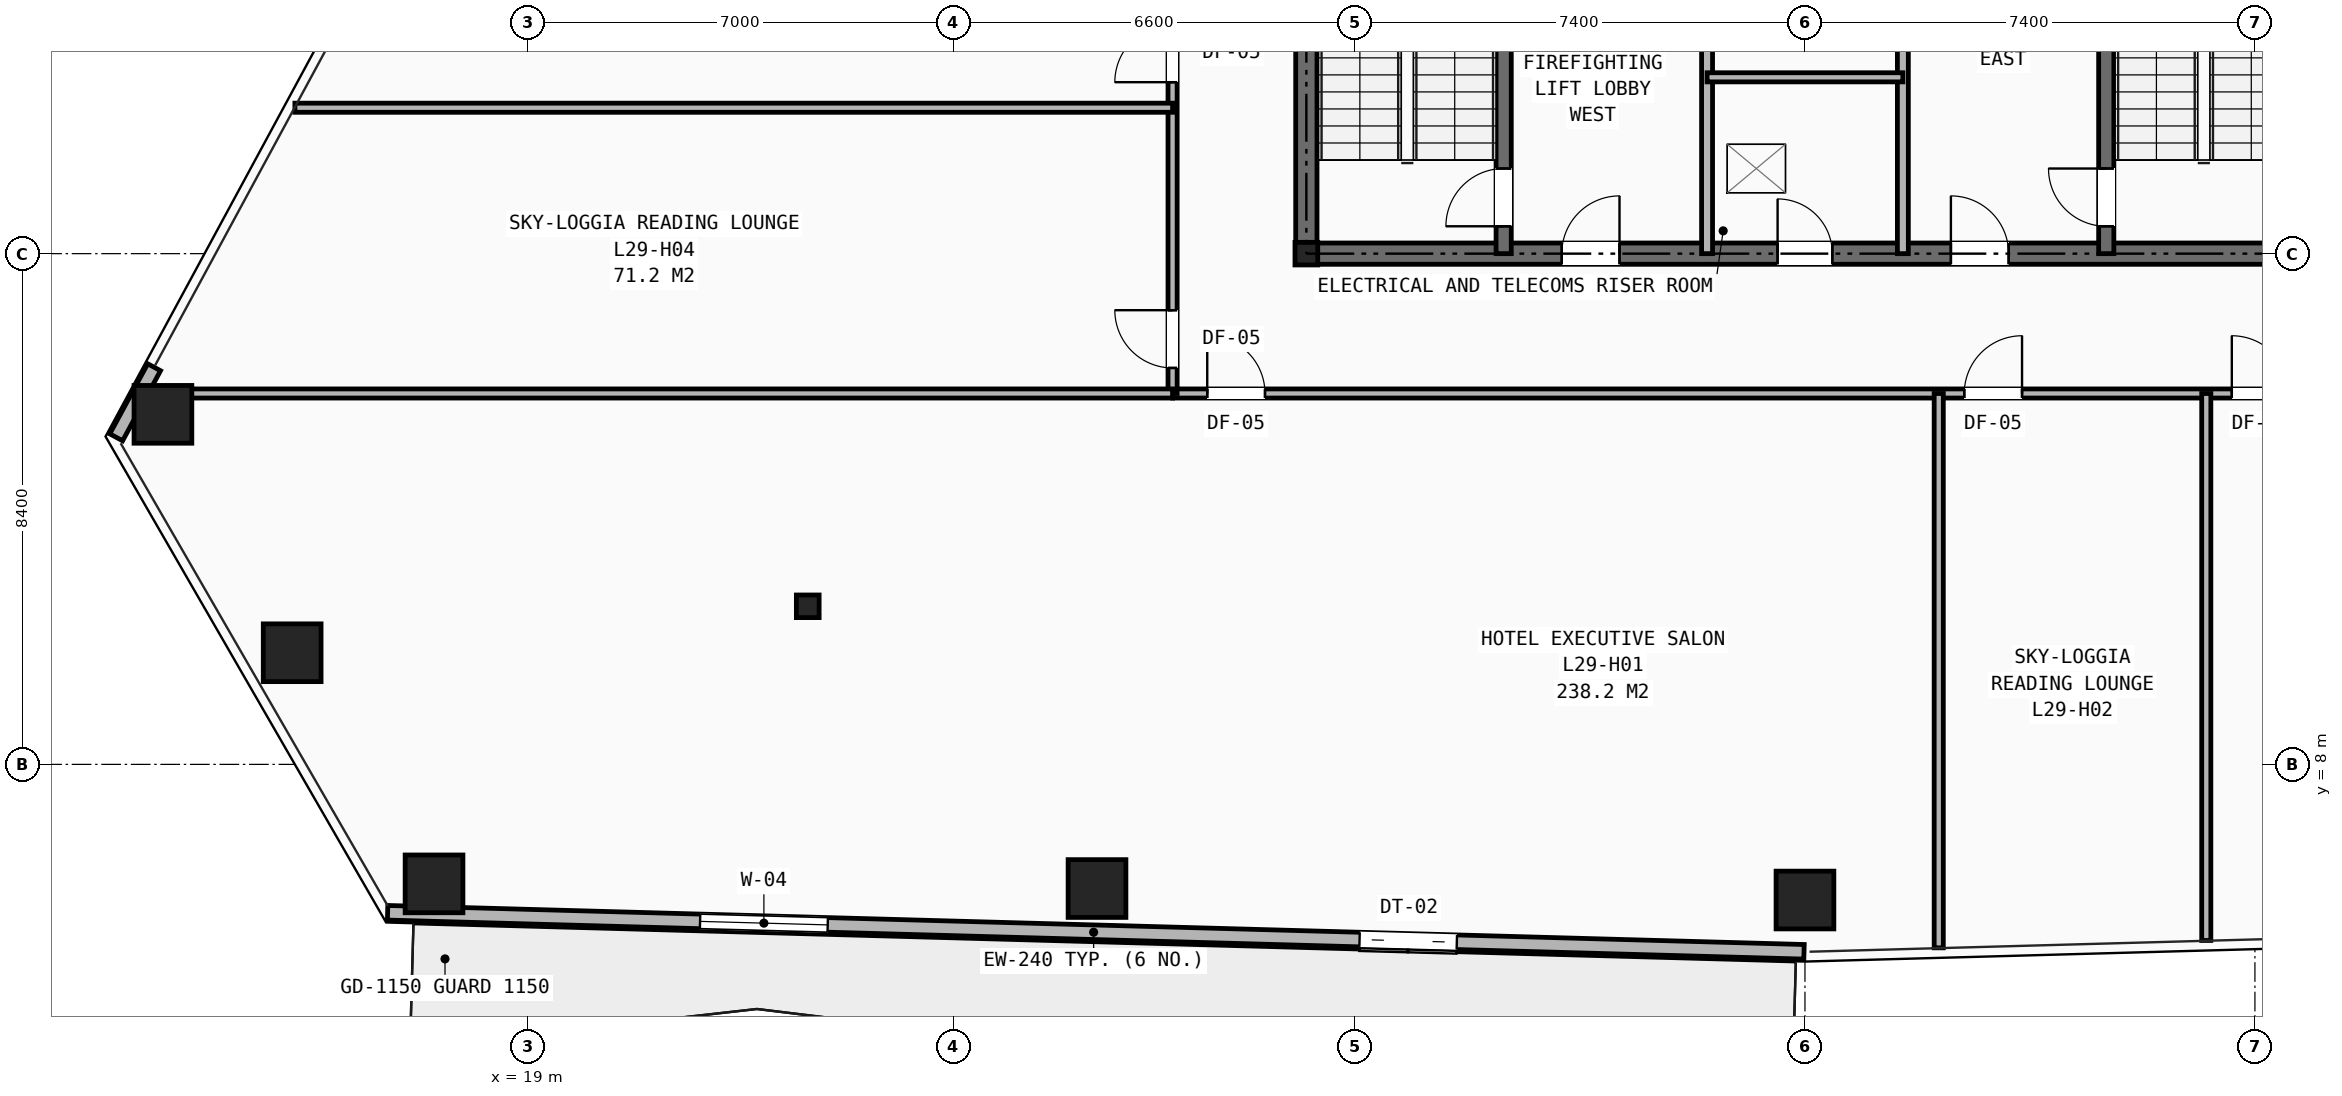
"""IFC4 building model, lengths in metres.
Left out: names, types, materials, properties, quantities, classifications, styles, units other than length and angle.
Written with IfcOpenShell. Run it as: python <this file> out.ifc"""

import sys

from ifc_helpers import new_model, si_unit, direction, frame, frame_2d, origin, origin_2d, place, context, subcontext, project, spatial, rectangle, hollow_rectangle, i_section, extrude, element, fill, save


model = new_model("IFC4")
c1 = context("Model", 3, precision=1e-05, world=origin(), true_north=direction((0.0, 1.0)))
c2 = subcontext(c1, "Body", "Model", "MODEL_VIEW")
j1 = project(units=[si_unit("LENGTHUNIT", "METRE"), si_unit("PLANEANGLEUNIT", "RADIAN")], contexts=[c1])
p1 = place(None, origin())
s1 = spatial("IfcSite", under=j1, at=p1, CompositionType="ELEMENT")
p2 = place(p1, origin())
s2 = spatial("IfcBuilding", under=s1, at=p2, CompositionType="ELEMENT")
p3 = place(p2, frame((0.0, 0.0, 102.2)))
s3 = spatial("IfcBuildingStorey", under=s2, at=p3, CompositionType="ELEMENT", Elevation=102.2)
for number, where, z_axis, x_axis in (
    (1, (31.8, 16.4, 0.0), (0.0, 0.0, 1.0), (1.0, 0.0, 0.0)),
    (2, (23.6, 10.6, 0.0), (0.0, 0.0, 1.0), (1.0, 0.0, 0.0)),
):
    element("IfcColumn", number, at=place(p3, frame(where, z_axis=z_axis, x_axis=x_axis)), inside=s3, PredefinedType="COLUMN", context=c2, shape_type="SweptSolid", body=[
        extrude(i_section(OverallWidth=0.374, OverallDepth=0.372, WebThickness=0.016, FlangeThickness=0.026, at=origin_2d()), origin(), (0.0, 0.0, 1.0), 3.2),
    ])
for number, where, z_axis, x_axis in (
    (3, (12.996, 13.757, 0.0), (0.0, 0.0, 1.0), (1.0, 0.0, 0.0)),
    (4, (15.121, 9.836, 0.0), (0.0, 0.0, 1.0), (1.0, 0.0, 0.0)),
    (5, (17.454, 6.035, 0.0), (0.0, 0.0, 1.0), (1.0, 0.0, 0.0)),
    (6, (28.357, 5.958, 0.0), (0.0, 0.0, 1.0), (1.0, 0.0, 0.0)),
    (7, (40.0, 5.769, 0.0), (0.0, 0.0, 1.0), (1.0, 0.0, 0.0)),
):
    element("IfcColumn", number, at=place(p3, frame(where, z_axis=z_axis, x_axis=x_axis)), inside=s3, PredefinedType="COLUMN", context=c2, shape_type="SweptSolid", body=[
        extrude(hollow_rectangle(XDim=0.95, YDim=0.95, WallThickness=0.065, at=origin_2d()), origin(), (0.0, 0.0, 1.0), 3.2),
    ])
p4 = place(p3, frame((12.85, 14.532, 0.0), z_axis=(0.0, 0.0, 1.0), x_axis=(-0.475820948293, -0.879542167929, 0.0)))
e8 = element("IfcWall", 8, at=p4, inside=s3, PredefinedType="SHEAR", context=c2, shape_type="SweptSolid", body=[
    extrude(rectangle(XDim=1.311, YDim=0.24, at=frame_2d((0.655, 0.0))), origin(), (0.0, 0.0, 1.0), 2.253),
])
p5 = place(p3, frame((39.984, 4.917, 0.0), z_axis=(0.0, 0.0, 1.0), x_axis=(-0.999620599442, 0.027543731983, 0.0)))
e9 = element("IfcWall", 9, at=p5, inside=s3, PredefinedType="SHEAR", context=c2, shape_type="SweptSolid", body=[
    extrude(rectangle(XDim=23.303, YDim=0.24, at=frame_2d((11.651, 0.0))), origin(), (0.0, 0.0, 1.0), 2.253),
])
p6 = place(p5, frame((5.712, 0.0, 0.0)))
e10 = element("IfcOpeningElement", 10, at=p6, cuts=e9, PredefinedType="OPENING", context=c2, shape_type="SweptSolid", body=[
    extrude(rectangle(XDim=1.6, YDim=2.04, at=frame_2d((0.8, 1.02))), frame((0.0, 0.13, 0.0), z_axis=(0.0, -1.0, 0.0), x_axis=(1.0, 0.0, 0.0)), (0.0, 0.0, 1.0), 0.26),
])
p7 = place(p5, frame((16.062, 0.0, 0.25)))
e11 = element("IfcOpeningElement", 11, at=p7, cuts=e9, PredefinedType="OPENING", context=c2, shape_type="SweptSolid", body=[
    extrude(rectangle(XDim=2.1, YDim=1.7, at=frame_2d((1.05, 0.85))), frame((0.0, 0.13, 0.0), z_axis=(0.0, -1.0, 0.0), x_axis=(1.0, 0.0, 0.0)), (0.0, 0.0, 1.0), 0.26),
])
p8 = place(p3, frame((31.8, 16.4, 0.0), z_axis=(0.0, 0.0, 1.0), x_axis=(1.0, 0.0, 0.0)))
e12 = element("IfcWall", 12, at=p8, inside=s3, PredefinedType="SHEAR", context=c2, shape_type="SweptSolid", body=[
    extrude(rectangle(XDim=16.4, YDim=0.35, at=frame_2d((8.2, 0.0))), origin(), (0.0, 0.0, 1.0), 2.97),
])
p9 = place(p8, frame((7.75, 0.0, 0.0)))
e13 = element("IfcOpeningElement", 13, at=p9, cuts=e12, PredefinedType="OPENING", context=c2, shape_type="SweptSolid", body=[
    extrude(rectangle(XDim=0.9, YDim=2.1, at=frame_2d((0.45, 1.05))), frame((0.0, 0.185, 0.0), z_axis=(0.0, -1.0, 0.0), x_axis=(1.0, 0.0, 0.0)), (0.0, 0.0, 1.0), 0.37),
])
p10 = place(p8, frame((4.2, 0.0, 0.0)))
e14 = element("IfcOpeningElement", 14, at=p10, cuts=e12, PredefinedType="OPENING", context=c2, shape_type="SweptSolid", body=[
    extrude(rectangle(XDim=0.95, YDim=2.1, at=frame_2d((0.475, 1.05))), frame((0.0, 0.185, 0.0), z_axis=(0.0, -1.0, 0.0), x_axis=(1.0, 0.0, 0.0)), (0.0, 0.0, 1.0), 0.37),
])
p11 = place(p8, frame((10.6, 0.0, 0.0)))
e15 = element("IfcOpeningElement", 15, at=p11, cuts=e12, PredefinedType="OPENING", context=c2, shape_type="SweptSolid", body=[
    extrude(rectangle(XDim=0.95, YDim=2.1, at=frame_2d((0.475, 1.05))), frame((0.0, 0.185, 0.0), z_axis=(0.0, -1.0, 0.0), x_axis=(1.0, 0.0, 0.0)), (0.0, 0.0, 1.0), 0.37),
])
p12 = place(p3, frame((31.8, 16.4, 0.0), z_axis=(0.0, 0.0, 1.0), x_axis=(0.0, 1.0, 0.0)))
e16 = element("IfcWall", 16, at=p12, inside=s3, PredefinedType="SHEAR", context=c2, shape_type="SweptSolid", body=[
    extrude(rectangle(XDim=14.8, YDim=0.35, at=frame_2d((7.4, 0.0))), origin(), (0.0, 0.0, 1.0), 2.97),
])
p13 = place(p12, frame((11.0, 0.0, 0.0)))
e17 = element("IfcOpeningElement", 17, at=p13, cuts=e16, PredefinedType="OPENING", context=c2, shape_type="SweptSolid", body=[
    extrude(rectangle(XDim=1.1, YDim=2.15, at=frame_2d((0.55, 1.075))), frame((0.0, 0.185, 0.0), z_axis=(0.0, -1.0, 0.0), x_axis=(1.0, 0.0, 0.0)), (0.0, 0.0, 1.0), 0.37),
])
p14 = place(p3, frame((35.045, 16.4, 0.0), z_axis=(0.0, 0.0, 1.0), x_axis=(0.0, 1.0, 0.0)))
e18 = element("IfcWall", 18, at=p14, inside=s3, PredefinedType="SHEAR", context=c2, shape_type="SweptSolid", body=[
    extrude(rectangle(XDim=8.4, YDim=0.25, at=frame_2d((4.2, 0.0))), origin(), (0.0, 0.0, 1.0), 2.97),
])
p15 = place(p14, frame((0.45, 0.0, 0.0)))
e19 = element("IfcOpeningElement", 19, at=p15, cuts=e18, PredefinedType="OPENING", context=c2, shape_type="SweptSolid", body=[
    extrude(rectangle(XDim=0.95, YDim=2.1, at=frame_2d((0.475, 1.05))), frame((0.0, 0.135, 0.0), z_axis=(0.0, -1.0, 0.0), x_axis=(1.0, 0.0, 0.0)), (0.0, 0.0, 1.0), 0.27),
])
p16 = place(p3, frame((44.955, 16.4, 0.0), z_axis=(0.0, 0.0, 1.0), x_axis=(0.0, 1.0, 0.0)))
e20 = element("IfcWall", 20, at=p16, inside=s3, PredefinedType="SHEAR", context=c2, shape_type="SweptSolid", body=[
    extrude(rectangle(XDim=8.4, YDim=0.25, at=frame_2d((4.2, 0.0))), origin(), (0.0, 0.0, 1.0), 2.97),
])
p17 = place(p16, frame((0.45, 0.0, 0.0)))
e21 = element("IfcOpeningElement", 21, at=p17, cuts=e20, PredefinedType="OPENING", context=c2, shape_type="SweptSolid", body=[
    extrude(rectangle(XDim=0.95, YDim=2.1, at=frame_2d((0.475, 1.05))), frame((0.0, 0.135, 0.0), z_axis=(0.0, -1.0, 0.0), x_axis=(1.0, 0.0, 0.0)), (0.0, 0.0, 1.0), 0.27),
])
p18 = place(p3, frame((38.39, 16.4, 0.0), z_axis=(0.0, 0.0, 1.0), x_axis=(0.0, 1.0, 0.0)))
e22 = element("IfcWall", 22, at=p18, inside=s3, PredefinedType="PARTITIONING", context=c2, shape_type="SweptSolid", body=[
    extrude(rectangle(XDim=8.4, YDim=0.18, at=frame_2d((4.2, 0.0))), origin(), (0.0, 0.0, 1.0), 2.421),
])
p19 = place(p18, frame((3.8, 0.0, 0.0)))
e23 = element("IfcOpeningElement", 23, at=p19, cuts=e22, PredefinedType="OPENING", context=c2, shape_type="SweptSolid", body=[
    extrude(rectangle(XDim=0.95, YDim=2.1, at=frame_2d((0.475, 1.05))), frame((0.0, 0.1, 0.0), z_axis=(0.0, -1.0, 0.0), x_axis=(1.0, 0.0, 0.0)), (0.0, 0.0, 1.0), 0.2),
])
p20 = place(p3, frame((41.61, 16.4, 0.0), z_axis=(0.0, 0.0, 1.0), x_axis=(0.0, 1.0, 0.0)))
e24 = element("IfcWall", 24, at=p20, inside=s3, PredefinedType="PARTITIONING", context=c2, shape_type="SweptSolid", body=[
    extrude(rectangle(XDim=8.4, YDim=0.18, at=frame_2d((4.2, 0.0))), origin(), (0.0, 0.0, 1.0), 2.421),
])
p21 = place(p3, frame((38.39, 19.3, 0.0), z_axis=(0.0, 0.0, 1.0), x_axis=(1.0, 0.0, 0.0)))
e25 = element("IfcWall", 25, at=p21, inside=s3, PredefinedType="PARTITIONING", context=c2, shape_type="SweptSolid", body=[
    extrude(rectangle(XDim=3.22, YDim=0.15, at=frame_2d((1.61, 0.0))), origin(), (0.0, 0.0, 1.0), 2.97),
])
p22 = place(p3, frame((29.6, 14.1, 0.0), z_axis=(0.0, 0.0, 1.0), x_axis=(1.0, 0.0, 0.0)))
e26 = element("IfcWall", 26, at=p22, inside=s3, PredefinedType="PARTITIONING", context=c2, shape_type="SweptSolid", body=[
    extrude(rectangle(XDim=20.8, YDim=0.15, at=frame_2d((10.4, 0.0))), origin(), (0.0, 0.0, 1.0), 2.421),
])
p23 = place(p22, frame((0.57, 0.0, 0.0)))
e27 = element("IfcOpeningElement", 27, at=p23, cuts=e26, PredefinedType="OPENING", context=c2, shape_type="SweptSolid", body=[
    extrude(rectangle(XDim=0.95, YDim=2.1, at=frame_2d((0.475, 1.05))), frame((0.0, 0.085, 0.0), z_axis=(0.0, -1.0, 0.0), x_axis=(1.0, 0.0, 0.0)), (0.0, 0.0, 1.0), 0.17),
])
p24 = place(p22, frame((13.02, 0.0, 0.0)))
e28 = element("IfcOpeningElement", 28, at=p24, cuts=e26, PredefinedType="OPENING", context=c2, shape_type="SweptSolid", body=[
    extrude(rectangle(XDim=0.95, YDim=2.1, at=frame_2d((0.475, 1.05))), frame((0.0, 0.085, 0.0), z_axis=(0.0, -1.0, 0.0), x_axis=(1.0, 0.0, 0.0)), (0.0, 0.0, 1.0), 0.17),
])
p25 = place(p22, frame((17.42, 0.0, 0.0)))
e29 = element("IfcOpeningElement", 29, at=p25, cuts=e26, PredefinedType="OPENING", context=c2, shape_type="SweptSolid", body=[
    extrude(rectangle(XDim=0.95, YDim=2.1, at=frame_2d((0.475, 1.05))), frame((0.0, 0.085, 0.0), z_axis=(0.0, -1.0, 0.0), x_axis=(1.0, 0.0, 0.0)), (0.0, 0.0, 1.0), 0.17),
])
p26 = place(p3, frame((29.6, 14.1, 0.0), z_axis=(0.0, 0.0, 1.0), x_axis=(0.0, 1.0, 0.0)))
e30 = element("IfcWall", 30, at=p26, inside=s3, PredefinedType="PARTITIONING", context=c2, shape_type="SweptSolid", body=[
    extrude(rectangle(XDim=21.9, YDim=0.15, at=frame_2d((10.95, 0.0))), origin(), (0.0, 0.0, 1.0), 2.421),
])
p27 = place(p26, frame((0.42, 0.0, 0.0)))
e31 = element("IfcOpeningElement", 31, at=p27, cuts=e30, PredefinedType="OPENING", context=c2, shape_type="SweptSolid", body=[
    extrude(rectangle(XDim=0.95, YDim=2.1, at=frame_2d((0.475, 1.05))), frame((0.0, 0.085, 0.0), z_axis=(0.0, -1.0, 0.0), x_axis=(1.0, 0.0, 0.0)), (0.0, 0.0, 1.0), 0.17),
])
p28 = place(p26, frame((5.12, 0.0, 0.0)))
e32 = element("IfcOpeningElement", 32, at=p28, cuts=e30, PredefinedType="OPENING", context=c2, shape_type="SweptSolid", body=[
    extrude(rectangle(XDim=0.95, YDim=2.1, at=frame_2d((0.475, 1.05))), frame((0.0, 0.085, 0.0), z_axis=(0.0, -1.0, 0.0), x_axis=(1.0, 0.0, 0.0)), (0.0, 0.0, 1.0), 0.17),
])
p29 = place(p26, frame((10.32, 0.0, 0.0)))
e33 = element("IfcOpeningElement", 33, at=p29, cuts=e30, PredefinedType="OPENING", context=c2, shape_type="SweptSolid", body=[
    extrude(rectangle(XDim=0.95, YDim=2.1, at=frame_2d((0.475, 1.05))), frame((0.0, 0.085, 0.0), z_axis=(0.0, -1.0, 0.0), x_axis=(1.0, 0.0, 0.0)), (0.0, 0.0, 1.0), 0.17),
])
p30 = place(p26, frame((16.12, 0.0, 0.0)))
e34 = element("IfcOpeningElement", 34, at=p30, cuts=e30, PredefinedType="OPENING", context=c2, shape_type="SweptSolid", body=[
    extrude(rectangle(XDim=0.95, YDim=2.1, at=frame_2d((0.475, 1.05))), frame((0.0, 0.085, 0.0), z_axis=(0.0, -1.0, 0.0), x_axis=(1.0, 0.0, 0.0)), (0.0, 0.0, 1.0), 0.17),
])
p31 = place(p3, frame((42.2, 4.983, 0.0), z_axis=(0.0, 0.0, 1.0), x_axis=(0.0, 1.0, 0.0)))
e35 = element("IfcWall", 35, at=p31, inside=s3, PredefinedType="PARTITIONING", context=c2, shape_type="SweptSolid", body=[
    extrude(rectangle(XDim=9.117, YDim=0.15, at=frame_2d((4.559, 0.0))), origin(), (0.0, 0.0, 1.0), 2.258),
])
p32 = place(p3, frame((46.6, 5.104, 0.0), z_axis=(0.0, 0.0, 1.0), x_axis=(0.0, 1.0, 0.0)))
e36 = element("IfcWall", 36, at=p32, inside=s3, PredefinedType="PARTITIONING", context=c2, shape_type="SweptSolid", body=[
    extrude(rectangle(XDim=8.996, YDim=0.15, at=frame_2d((4.498, 0.0))), origin(), (0.0, 0.0, 1.0), 2.258),
])
p33 = place(p3, frame((12.622, 14.1, 0.0), z_axis=(0.0, 0.0, 1.0), x_axis=(1.0, 0.0, 0.0)))
e37 = element("IfcWall", 37, at=p33, inside=s3, PredefinedType="PARTITIONING", context=c2, shape_type="SweptSolid", body=[
    extrude(rectangle(XDim=16.978, YDim=0.15, at=frame_2d((8.489, 0.0))), origin(), (0.0, 0.0, 1.0), 2.258),
])
p34 = place(p3, frame((15.166, 18.8, 0.0), z_axis=(0.0, 0.0, 1.0), x_axis=(1.0, 0.0, 0.0)))
e38 = element("IfcWall", 38, at=p34, inside=s3, PredefinedType="PARTITIONING", context=c2, shape_type="SweptSolid", body=[
    extrude(rectangle(XDim=14.434, YDim=0.15, at=frame_2d((7.217, 0.0))), origin(), (0.0, 0.0, 1.0), 2.258),
])
p35 = place(p6, origin())
e39 = element("IfcDoor", 39, at=p35, inside=s3, OperationType="SINGLE_SWING_LEFT", PredefinedType="DOOR", context=c2, shape_type="SweptSolid", body=[
    extrude(rectangle(XDim=1.6, YDim=2.04, at=frame_2d((0.8, 1.02))), frame((0.0, 0.025, 0.0), z_axis=(0.0, -1.0, 0.0), x_axis=(1.0, 0.0, 0.0)), (0.0, 0.0, 1.0), 0.05),
])
fill(e10, e39)
p36 = place(p7, origin())
e40 = element("IfcWindow", 40, at=p36, inside=s3, PartitioningType="SINGLE_PANEL", PredefinedType="WINDOW", context=c2, shape_type="SweptSolid", body=[
    extrude(rectangle(XDim=2.1, YDim=1.7, at=frame_2d((1.05, 0.85))), frame((0.0, 0.03, 0.0), z_axis=(0.0, -1.0, 0.0), x_axis=(1.0, 0.0, 0.0)), (0.0, 0.0, 1.0), 0.06),
])
fill(e11, e40)
p37 = place(p9, origin())
e41 = element("IfcDoor", 41, at=p37, inside=s3, OperationType="SINGLE_SWING_LEFT", PredefinedType="DOOR", context=c2, shape_type="SweptSolid", body=[
    extrude(rectangle(XDim=0.9, YDim=2.1, at=frame_2d((0.45, 1.05))), frame((0.0, 0.025, 0.0), z_axis=(0.0, -1.0, 0.0), x_axis=(1.0, 0.0, 0.0)), (0.0, 0.0, 1.0), 0.05),
])
fill(e13, e41)
p38 = place(p15, origin())
e42 = element("IfcDoor", 42, at=p38, inside=s3, OperationType="SINGLE_SWING_LEFT", PredefinedType="DOOR", context=c2, shape_type="SweptSolid", body=[
    extrude(rectangle(XDim=0.95, YDim=2.1, at=frame_2d((0.475, 1.05))), frame((0.0, 0.025, 0.0), z_axis=(0.0, -1.0, 0.0), x_axis=(1.0, 0.0, 0.0)), (0.0, 0.0, 1.0), 0.05),
])
fill(e19, e42)
p39 = place(p17, origin())
e43 = element("IfcDoor", 43, at=p39, inside=s3, OperationType="SINGLE_SWING_RIGHT", PredefinedType="DOOR", context=c2, shape_type="SweptSolid", body=[
    extrude(rectangle(XDim=0.95, YDim=2.1, at=frame_2d((0.475, 1.05))), frame((0.0, 0.025, 0.0), z_axis=(0.0, -1.0, 0.0), x_axis=(1.0, 0.0, 0.0)), (0.0, 0.0, 1.0), 0.05),
])
fill(e21, e43)
p40 = place(p10, origin())
e44 = element("IfcDoor", 44, at=p40, inside=s3, OperationType="SINGLE_SWING_RIGHT", PredefinedType="DOOR", context=c2, shape_type="SweptSolid", body=[
    extrude(rectangle(XDim=0.95, YDim=2.1, at=frame_2d((0.475, 1.05))), frame((0.0, 0.025, 0.0), z_axis=(0.0, -1.0, 0.0), x_axis=(1.0, 0.0, 0.0)), (0.0, 0.0, 1.0), 0.05),
])
fill(e14, e44)
p41 = place(p11, origin())
e45 = element("IfcDoor", 45, at=p41, inside=s3, OperationType="SINGLE_SWING_LEFT", PredefinedType="DOOR", context=c2, shape_type="SweptSolid", body=[
    extrude(rectangle(XDim=0.95, YDim=2.1, at=frame_2d((0.475, 1.05))), frame((0.0, 0.025, 0.0), z_axis=(0.0, -1.0, 0.0), x_axis=(1.0, 0.0, 0.0)), (0.0, 0.0, 1.0), 0.05),
])
fill(e15, e45)
p42 = place(p23, origin())
e46 = element("IfcDoor", 46, at=p42, inside=s3, OperationType="SINGLE_SWING_LEFT", PredefinedType="DOOR", context=c2, shape_type="SweptSolid", body=[
    extrude(rectangle(XDim=0.95, YDim=2.1, at=frame_2d((0.475, 1.05))), frame((0.0, 0.025, 0.0), z_axis=(0.0, -1.0, 0.0), x_axis=(1.0, 0.0, 0.0)), (0.0, 0.0, 1.0), 0.05),
])
fill(e27, e46)
p43 = place(p24, origin())
e47 = element("IfcDoor", 47, at=p43, inside=s3, OperationType="SINGLE_SWING_RIGHT", PredefinedType="DOOR", context=c2, shape_type="SweptSolid", body=[
    extrude(rectangle(XDim=0.95, YDim=2.1, at=frame_2d((0.475, 1.05))), frame((0.0, 0.025, 0.0), z_axis=(0.0, -1.0, 0.0), x_axis=(1.0, 0.0, 0.0)), (0.0, 0.0, 1.0), 0.05),
])
fill(e28, e47)
p44 = place(p25, origin())
e48 = element("IfcDoor", 48, at=p44, inside=s3, OperationType="SINGLE_SWING_LEFT", PredefinedType="DOOR", context=c2, shape_type="SweptSolid", body=[
    extrude(rectangle(XDim=0.95, YDim=2.1, at=frame_2d((0.475, 1.05))), frame((0.0, 0.025, 0.0), z_axis=(0.0, -1.0, 0.0), x_axis=(1.0, 0.0, 0.0)), (0.0, 0.0, 1.0), 0.05),
])
fill(e29, e48)
p45 = place(p27, origin())
e49 = element("IfcDoor", 49, at=p45, inside=s3, OperationType="SINGLE_SWING_RIGHT", PredefinedType="DOOR", context=c2, shape_type="SweptSolid", body=[
    extrude(rectangle(XDim=0.95, YDim=2.1, at=frame_2d((0.475, 1.05))), frame((0.0, 0.025, 0.0), z_axis=(0.0, -1.0, 0.0), x_axis=(1.0, 0.0, 0.0)), (0.0, 0.0, 1.0), 0.05),
])
fill(e31, e49)
p46 = place(p28, origin())
e50 = element("IfcDoor", 50, at=p46, inside=s3, OperationType="SINGLE_SWING_LEFT", PredefinedType="DOOR", context=c2, shape_type="SweptSolid", body=[
    extrude(rectangle(XDim=0.95, YDim=2.1, at=frame_2d((0.475, 1.05))), frame((0.0, 0.025, 0.0), z_axis=(0.0, -1.0, 0.0), x_axis=(1.0, 0.0, 0.0)), (0.0, 0.0, 1.0), 0.05),
])
fill(e32, e50)
save(model, sys.argv[1])
